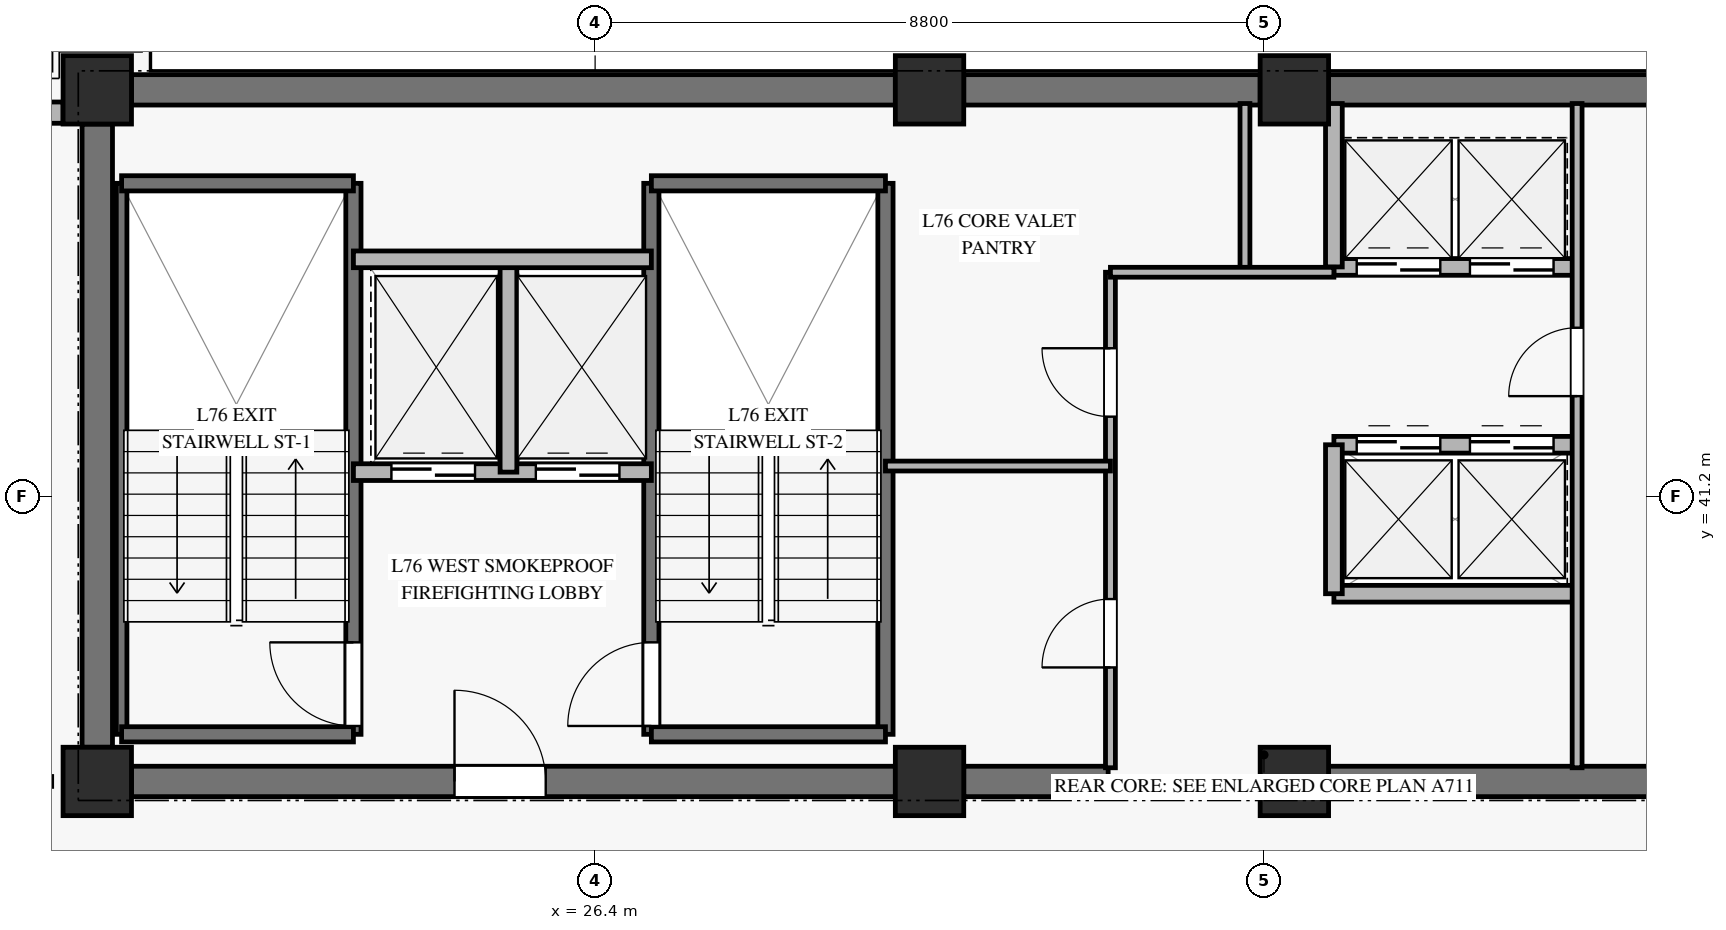
"""IFC4 building model, lengths in metres.
Left out: names, types, materials, properties, quantities, classifications, styles, units other than length and angle.
Written with IfcOpenShell. Run it as: python <this file> out.ifc"""

import sys

from ifc_helpers import new_model, si_unit, direction, frame, frame_2d, origin, origin_2d, place, context, subcontext, project, spatial, rectangle, extrude, source, transform, mapped, element, fill, save


model = new_model("IFC4")
c1 = context("Model", 3, precision=1e-05, world=origin(), true_north=direction((0.0, 1.0)))
c2 = subcontext(c1, "Body", "Model", "MODEL_VIEW")
j1 = project(units=[si_unit("LENGTHUNIT", "METRE"), si_unit("PLANEANGLEUNIT", "RADIAN")], contexts=[c1])
p1 = place(None, origin())
s1 = spatial("IfcSite", under=j1, at=p1, CompositionType="ELEMENT")
p2 = place(p1, origin())
s2 = spatial("IfcBuilding", under=s1, at=p2, CompositionType="ELEMENT")
p3 = place(p2, frame((0.0, 0.0, 297.2)))
s3 = spatial("IfcBuildingStorey", under=s2, at=p3, CompositionType="ELEMENT", Elevation=297.2)
m1 = source(origin(), c2, "Body", "SweptSolid", [
    extrude(rectangle(XDim=0.9, YDim=0.9, at=origin_2d()), origin(), (0.0, 0.0, 1.0), 3.185),
])
for number, where, z_axis, x_axis in (
    (1, (19.85, 37.45, 0.0), (0.0, 0.0, 1.0), (1.0, 0.0, 0.0)),
    (2, (19.85, 46.55, 0.0), (0.0, 0.0, 1.0), (1.0, 0.0, 0.0)),
    (3, (30.8, 37.45, 0.0), (0.0, 0.0, 1.0), (1.0, 0.0, 0.0)),
    (4, (30.8, 46.55, 0.0), (0.0, 0.0, 1.0), (1.0, 0.0, 0.0)),
    (5, (35.6, 37.45, 0.0), (0.0, 0.0, 1.0), (1.0, 0.0, 0.0)),
    (6, (35.6, 46.55, 0.0), (0.0, 0.0, 1.0), (1.0, 0.0, 0.0)),
):
    element("IfcColumn", number, at=place(p3, frame(where, z_axis=z_axis, x_axis=x_axis)), inside=s3, PredefinedType="PILASTER", context=c2, shape_type="MappedRepresentation", body=[
        mapped(m1, transform((0.0, 0.0, 0.0), x_axis=(1.0, 0.0, 0.0), y_axis=(0.0, 1.0, 0.0), z_axis=(0.0, 0.0, 1.0), scale=1.0)),
    ])
p4 = place(p3, frame((20.3, 46.55, 0.0), z_axis=(0.0, 0.0, 1.0), x_axis=(1.0, 0.0, 0.0)))
e7 = element("IfcWall", 7, at=p4, inside=s3, PredefinedType="SHEAR", context=c2, shape_type="SweptSolid", body=[
    extrude(rectangle(XDim=10.05, YDim=0.4, at=frame_2d((5.025, 0.0))), origin(), (0.0, 0.0, 1.0), 3.185),
])
p5 = place(p3, frame((31.25, 46.55, 0.0), z_axis=(0.0, 0.0, 1.0), x_axis=(1.0, 0.0, 0.0)))
e8 = element("IfcWall", 8, at=p5, inside=s3, PredefinedType="SHEAR", context=c2, shape_type="SweptSolid", body=[
    extrude(rectangle(XDim=3.9, YDim=0.4, at=frame_2d((1.95, 0.0))), origin(), (0.0, 0.0, 1.0), 3.185),
])
p6 = place(p3, frame((36.05, 46.55, 0.0), z_axis=(0.0, 0.0, 1.0), x_axis=(1.0, 0.0, 0.0)))
e9 = element("IfcWall", 9, at=p6, inside=s3, PredefinedType="SHEAR", context=c2, shape_type="SweptSolid", body=[
    extrude(rectangle(XDim=7.8, YDim=0.4, at=frame_2d((3.9, 0.0))), origin(), (0.0, 0.0, 1.0), 3.185),
])
p7 = place(p3, frame((20.3, 37.45, 0.0), z_axis=(0.0, 0.0, 1.0), x_axis=(1.0, 0.0, 0.0)))
e10 = element("IfcWall", 10, at=p7, inside=s3, PredefinedType="SHEAR", context=c2, shape_type="SweptSolid", body=[
    extrude(rectangle(XDim=10.05, YDim=0.4, at=frame_2d((5.025, 0.0))), origin(), (0.0, 0.0, 1.0), 3.185),
])
p8 = place(p7, frame((4.25, 0.0, 0.0)))
e11 = element("IfcOpeningElement", 11, at=p8, cuts=e10, PredefinedType="OPENING", context=c2, shape_type="SweptSolid", body=[
    extrude(rectangle(XDim=1.2, YDim=2.15, at=frame_2d((0.6, 1.075))), frame((0.0, 0.21, 0.0), z_axis=(0.0, -1.0, 0.0), x_axis=(1.0, 0.0, 0.0)), (0.0, 0.0, 1.0), 0.42),
])
p9 = place(p3, frame((31.25, 37.45, 0.0), z_axis=(0.0, 0.0, 1.0), x_axis=(1.0, 0.0, 0.0)))
e12 = element("IfcWall", 12, at=p9, inside=s3, PredefinedType="SHEAR", context=c2, shape_type="SweptSolid", body=[
    extrude(rectangle(XDim=1.9, YDim=0.4, at=frame_2d((0.95, 0.0))), origin(), (0.0, 0.0, 1.0), 3.185),
])
p10 = place(p3, frame((36.05, 37.45, 0.0), z_axis=(0.0, 0.0, 1.0), x_axis=(1.0, 0.0, 0.0)))
e13 = element("IfcWall", 13, at=p10, inside=s3, PredefinedType="SHEAR", context=c2, shape_type="SweptSolid", body=[
    extrude(rectangle(XDim=7.8, YDim=0.4, at=frame_2d((3.9, 0.0))), origin(), (0.0, 0.0, 1.0), 3.185),
])
p11 = place(p3, frame((19.85, 37.9, 0.0), z_axis=(0.0, 0.0, 1.0), x_axis=(0.0, 1.0, 0.0)))
e14 = element("IfcWall", 14, at=p11, inside=s3, PredefinedType="SHEAR", context=c2, shape_type="SweptSolid", body=[
    extrude(rectangle(XDim=8.2, YDim=0.4, at=frame_2d((4.1, 0.0))), origin(), (0.0, 0.0, 1.0), 3.185),
])
p12 = place(p3, frame((12.68, 46.25, 0.0), z_axis=(0.0, 0.0, 1.0), x_axis=(1.0, 0.0, 0.0)))
e15 = element("IfcWall", 15, at=p12, inside=s3, PredefinedType="SOLIDWALL", context=c2, shape_type="SweptSolid", body=[
    extrude(rectangle(XDim=6.72, YDim=0.28, at=frame_2d((3.36, 0.0))), origin(), (0.0, 0.0, 1.0), 2.815),
])
p13 = place(p12, frame((2.56, 0.0, 0.45)))
e16 = element("IfcOpeningElement", 16, at=p13, cuts=e15, PredefinedType="OPENING", context=c2, shape_type="SweptSolid", body=[
    extrude(rectangle(XDim=1.6, YDim=2.0, at=frame_2d((0.8, 1.0))), frame((0.0, 0.15, 0.0), z_axis=(0.0, -1.0, 0.0), x_axis=(1.0, 0.0, 0.0)), (0.0, 0.0, 1.0), 0.3),
])
p14 = place(p3, frame((20.17, 38.07, 0.0), z_axis=(0.0, 0.0, 1.0), x_axis=(0.0, 1.0, 0.0)))
e17 = element("IfcWall", 17, at=p14, inside=s3, PredefinedType="SOLIDWALL", context=c2, shape_type="SweptSolid", body=[
    extrude(rectangle(XDim=7.25, YDim=0.14, at=frame_2d((3.625, 0.0))), origin(), (0.0, 0.0, 1.0), 3.4),
])
p15 = place(p3, frame((23.22, 38.07, 0.0), z_axis=(0.0, 0.0, 1.0), x_axis=(0.0, 1.0, 0.0)))
e18 = element("IfcWall", 18, at=p15, inside=s3, PredefinedType="SOLIDWALL", context=c2, shape_type="SweptSolid", body=[
    extrude(rectangle(XDim=7.25, YDim=0.2, at=frame_2d((3.625, 0.0))), origin(), (0.0, 0.0, 1.0), 3.4),
])
p16 = place(p15, frame((0.11, 0.0, 0.0)))
e19 = element("IfcOpeningElement", 19, at=p16, cuts=e18, PredefinedType="OPENING", context=c2, shape_type="SweptSolid", body=[
    extrude(rectangle(XDim=1.1, YDim=2.15, at=frame_2d((0.55, 1.075))), frame((0.0, 0.11, 0.0), z_axis=(0.0, -1.0, 0.0), x_axis=(1.0, 0.0, 0.0)), (0.0, 0.0, 1.0), 0.22),
])
for number, where, z_axis, x_axis in (
    (20, (20.17, 45.32, 0.0), (0.0, 0.0, 1.0), (1.0, 0.0, 0.0)),
    (21, (20.17, 38.07, 0.0), (0.0, 0.0, 1.0), (1.0, 0.0, 0.0)),
):
    element("IfcWall", number, at=place(p3, frame(where, z_axis=z_axis, x_axis=x_axis)), inside=s3, PredefinedType="SOLIDWALL", context=c2, shape_type="SweptSolid", body=[
        extrude(rectangle(XDim=3.05, YDim=0.2, at=frame_2d((1.525, 0.0))), origin(), (0.0, 0.0, 1.0), 3.4),
    ])
p17 = place(p3, frame((27.14, 38.07, 0.0), z_axis=(0.0, 0.0, 1.0), x_axis=(0.0, 1.0, 0.0)))
e22 = element("IfcWall", 22, at=p17, inside=s3, PredefinedType="SOLIDWALL", context=c2, shape_type="SweptSolid", body=[
    extrude(rectangle(XDim=7.25, YDim=0.2, at=frame_2d((3.625, 0.0))), origin(), (0.0, 0.0, 1.0), 3.4),
])
p18 = place(p17, frame((0.11, 0.0, 0.0)))
e23 = element("IfcOpeningElement", 23, at=p18, cuts=e22, PredefinedType="OPENING", context=c2, shape_type="SweptSolid", body=[
    extrude(rectangle(XDim=1.1, YDim=2.15, at=frame_2d((0.55, 1.075))), frame((0.0, 0.11, 0.0), z_axis=(0.0, -1.0, 0.0), x_axis=(1.0, 0.0, 0.0)), (0.0, 0.0, 1.0), 0.22),
])
p19 = place(p3, frame((30.22, 38.07, 0.0), z_axis=(0.0, 0.0, 1.0), x_axis=(0.0, 1.0, 0.0)))
e24 = element("IfcWall", 24, at=p19, inside=s3, PredefinedType="SOLIDWALL", context=c2, shape_type="SweptSolid", body=[
    extrude(rectangle(XDim=7.25, YDim=0.2, at=frame_2d((3.625, 0.0))), origin(), (0.0, 0.0, 1.0), 3.4),
])
for number, where, z_axis, x_axis in (
    (25, (27.14, 45.32, 0.0), (0.0, 0.0, 1.0), (1.0, 0.0, 0.0)),
    (26, (27.14, 38.07, 0.0), (0.0, 0.0, 1.0), (1.0, 0.0, 0.0)),
):
    element("IfcWall", number, at=place(p3, frame(where, z_axis=z_axis, x_axis=x_axis)), inside=s3, PredefinedType="SOLIDWALL", context=c2, shape_type="SweptSolid", body=[
        extrude(rectangle(XDim=3.08, YDim=0.2, at=frame_2d((1.54, 0.0))), origin(), (0.0, 0.0, 1.0), 3.4),
    ])
p20 = place(p3, frame((23.22, 41.52, 0.0), z_axis=(0.0, 0.0, 1.0), x_axis=(1.0, 0.0, 0.0)))
e27 = element("IfcWall", 27, at=p20, inside=s3, PredefinedType="SOLIDWALL", context=c2, shape_type="SweptSolid", body=[
    extrude(rectangle(XDim=3.92, YDim=0.22, at=frame_2d((1.96, 0.0))), origin(), (0.0, 0.0, 1.0), 3.185),
])
p21 = place(p20, frame((0.5, 0.0, 0.0)))
e28 = element("IfcOpeningElement", 28, at=p21, cuts=e27, PredefinedType="OPENING", context=c2, shape_type="SweptSolid", body=[
    extrude(rectangle(XDim=1.1, YDim=2.2, at=frame_2d((0.55, 1.1))), frame((0.0, 0.12, 0.0), z_axis=(0.0, -1.0, 0.0), x_axis=(1.0, 0.0, 0.0)), (0.0, 0.0, 1.0), 0.24),
])
p22 = place(p20, frame((2.4, 0.0, 0.0)))
e29 = element("IfcOpeningElement", 29, at=p22, cuts=e27, PredefinedType="OPENING", context=c2, shape_type="SweptSolid", body=[
    extrude(rectangle(XDim=1.1, YDim=2.2, at=frame_2d((0.55, 1.1))), frame((0.0, 0.12, 0.0), z_axis=(0.0, -1.0, 0.0), x_axis=(1.0, 0.0, 0.0)), (0.0, 0.0, 1.0), 0.24),
])
p23 = place(p3, frame((25.26, 41.52, 0.0), z_axis=(0.0, 0.0, 1.0), x_axis=(0.0, 1.0, 0.0)))
e30 = element("IfcWall", 30, at=p23, inside=s3, PredefinedType="SOLIDWALL", context=c2, shape_type="SweptSolid", body=[
    extrude(rectangle(XDim=2.8, YDim=0.22, at=frame_2d((1.4, 0.0))), origin(), (0.0, 0.0, 1.0), 3.185),
])
p24 = place(p3, frame((23.22, 44.32, 0.0), z_axis=(0.0, 0.0, 1.0), x_axis=(1.0, 0.0, 0.0)))
e31 = element("IfcWall", 31, at=p24, inside=s3, PredefinedType="SOLIDWALL", context=c2, shape_type="SweptSolid", body=[
    extrude(rectangle(XDim=3.92, YDim=0.22, at=frame_2d((1.96, 0.0))), origin(), (0.0, 0.0, 1.0), 3.185),
])
p25 = place(p3, frame((36.12, 44.22, 0.0), z_axis=(0.0, 0.0, 1.0), x_axis=(1.0, 0.0, 0.0)))
e32 = element("IfcWall", 32, at=p25, inside=s3, PredefinedType="SOLIDWALL", context=c2, shape_type="SweptSolid", body=[
    extrude(rectangle(XDim=3.2, YDim=0.22, at=frame_2d((1.6, 0.0))), origin(), (0.0, 0.0, 1.0), 3.185),
])
p26 = place(p25, frame((0.3, 0.0, 0.0)))
e33 = element("IfcOpeningElement", 33, at=p26, cuts=e32, PredefinedType="OPENING", context=c2, shape_type="SweptSolid", body=[
    extrude(rectangle(XDim=1.1, YDim=2.2, at=frame_2d((0.55, 1.1))), frame((0.0, 0.12, 0.0), z_axis=(0.0, -1.0, 0.0), x_axis=(1.0, 0.0, 0.0)), (0.0, 0.0, 1.0), 0.24),
])
p27 = place(p25, frame((1.79, 0.0, 0.0)))
e34 = element("IfcOpeningElement", 34, at=p27, cuts=e32, PredefinedType="OPENING", context=c2, shape_type="SweptSolid", body=[
    extrude(rectangle(XDim=1.1, YDim=2.2, at=frame_2d((0.55, 1.1))), frame((0.0, 0.12, 0.0), z_axis=(0.0, -1.0, 0.0), x_axis=(1.0, 0.0, 0.0)), (0.0, 0.0, 1.0), 0.24),
])
p28 = place(p3, frame((36.12, 41.88, 0.0), z_axis=(0.0, 0.0, 1.0), x_axis=(1.0, 0.0, 0.0)))
e35 = element("IfcWall", 35, at=p28, inside=s3, PredefinedType="SOLIDWALL", context=c2, shape_type="SweptSolid", body=[
    extrude(rectangle(XDim=3.2, YDim=0.22, at=frame_2d((1.6, 0.0))), origin(), (0.0, 0.0, 1.0), 3.185),
])
p29 = place(p28, frame((0.3, 0.0, 0.0)))
e36 = element("IfcOpeningElement", 36, at=p29, cuts=e35, PredefinedType="OPENING", context=c2, shape_type="SweptSolid", body=[
    extrude(rectangle(XDim=1.1, YDim=2.2, at=frame_2d((0.55, 1.1))), frame((0.0, 0.12, 0.0), z_axis=(0.0, -1.0, 0.0), x_axis=(1.0, 0.0, 0.0)), (0.0, 0.0, 1.0), 0.24),
])
p30 = place(p28, frame((1.79, 0.0, 0.0)))
e37 = element("IfcOpeningElement", 37, at=p30, cuts=e35, PredefinedType="OPENING", context=c2, shape_type="SweptSolid", body=[
    extrude(rectangle(XDim=1.1, YDim=2.2, at=frame_2d((0.55, 1.1))), frame((0.0, 0.12, 0.0), z_axis=(0.0, -1.0, 0.0), x_axis=(1.0, 0.0, 0.0)), (0.0, 0.0, 1.0), 0.24),
])
p31 = place(p3, frame((36.12, 39.92, 0.0), z_axis=(0.0, 0.0, 1.0), x_axis=(1.0, 0.0, 0.0)))
e38 = element("IfcWall", 38, at=p31, inside=s3, PredefinedType="SOLIDWALL", context=c2, shape_type="SweptSolid", body=[
    extrude(rectangle(XDim=3.2, YDim=0.22, at=frame_2d((1.6, 0.0))), origin(), (0.0, 0.0, 1.0), 3.185),
])
p32 = place(p3, frame((36.12, 39.92, 0.0), z_axis=(0.0, 0.0, 1.0), x_axis=(0.0, 1.0, 0.0)))
e39 = element("IfcWall", 39, at=p32, inside=s3, PredefinedType="SOLIDWALL", context=c2, shape_type="SweptSolid", body=[
    extrude(rectangle(XDim=1.96, YDim=0.22, at=frame_2d((0.98, 0.0))), origin(), (0.0, 0.0, 1.0), 3.185),
])
p33 = place(p3, frame((36.12, 44.22, 0.0), z_axis=(0.0, 0.0, 1.0), x_axis=(0.0, 1.0, 0.0)))
e40 = element("IfcWall", 40, at=p33, inside=s3, PredefinedType="SOLIDWALL", context=c2, shape_type="SweptSolid", body=[
    extrude(rectangle(XDim=2.15, YDim=0.22, at=frame_2d((1.075, 0.0))), origin(), (0.0, 0.0, 1.0), 3.185),
])
p34 = place(p3, frame((33.18, 37.63, 0.0), z_axis=(0.0, 0.0, 1.0), x_axis=(0.0, 1.0, 0.0)))
e41 = element("IfcWall", 41, at=p34, inside=s3, PredefinedType="PARTITIONING", context=c2, shape_type="SweptSolid", body=[
    extrude(rectangle(XDim=6.52, YDim=0.13, at=frame_2d((3.26, 0.0))), origin(), (0.0, 0.0, 1.0), 2.27),
])
p35 = place(p34, frame((1.32, 0.0, 0.0)))
e42 = element("IfcOpeningElement", 42, at=p35, cuts=e41, PredefinedType="OPENING", context=c2, shape_type="SweptSolid", body=[
    extrude(rectangle(XDim=0.9, YDim=2.1, at=frame_2d((0.45, 1.05))), frame((0.0, 0.075, 0.0), z_axis=(0.0, -1.0, 0.0), x_axis=(1.0, 0.0, 0.0)), (0.0, 0.0, 1.0), 0.15),
])
p36 = place(p34, frame((4.62, 0.0, 0.0)))
e43 = element("IfcOpeningElement", 43, at=p36, cuts=e41, PredefinedType="OPENING", context=c2, shape_type="SweptSolid", body=[
    extrude(rectangle(XDim=0.9, YDim=2.1, at=frame_2d((0.45, 1.05))), frame((0.0, 0.075, 0.0), z_axis=(0.0, -1.0, 0.0), x_axis=(1.0, 0.0, 0.0)), (0.0, 0.0, 1.0), 0.15),
])
p37 = place(p3, frame((34.95, 44.15, 0.0), z_axis=(0.0, 0.0, 1.0), x_axis=(0.0, 1.0, 0.0)))
e44 = element("IfcWall", 44, at=p37, inside=s3, PredefinedType="PARTITIONING", context=c2, shape_type="SweptSolid", body=[
    extrude(rectangle(XDim=2.22, YDim=0.13, at=frame_2d((1.11, 0.0))), origin(), (0.0, 0.0, 1.0), 3.185),
])
p38 = place(p3, frame((33.18, 44.15, 0.0), z_axis=(0.0, 0.0, 1.0), x_axis=(1.0, 0.0, 0.0)))
e45 = element("IfcWall", 45, at=p38, inside=s3, PredefinedType="PARTITIONING", context=c2, shape_type="SweptSolid", body=[
    extrude(rectangle(XDim=2.94, YDim=0.13, at=frame_2d((1.47, 0.0))), origin(), (0.0, 0.0, 1.0), 2.47),
])
p39 = place(p3, frame((39.32, 37.63, 0.0), z_axis=(0.0, 0.0, 1.0), x_axis=(0.0, 1.0, 0.0)))
e46 = element("IfcWall", 46, at=p39, inside=s3, PredefinedType="PARTITIONING", context=c2, shape_type="SweptSolid", body=[
    extrude(rectangle(XDim=8.74, YDim=0.13, at=frame_2d((4.37, 0.0))), origin(), (0.0, 0.0, 1.0), 3.185),
])
p40 = place(p39, frame((4.89, 0.0, 0.0)))
e47 = element("IfcOpeningElement", 47, at=p40, cuts=e46, PredefinedType="OPENING", context=c2, shape_type="SweptSolid", body=[
    extrude(rectangle(XDim=0.9, YDim=2.1, at=frame_2d((0.45, 1.05))), frame((0.0, 0.075, 0.0), z_axis=(0.0, -1.0, 0.0), x_axis=(1.0, 0.0, 0.0)), (0.0, 0.0, 1.0), 0.15),
])
p41 = place(p3, frame((30.22, 41.6, 0.0), z_axis=(0.0, 0.0, 1.0), x_axis=(1.0, 0.0, 0.0)))
e48 = element("IfcWall", 48, at=p41, inside=s3, PredefinedType="PARTITIONING", context=c2, shape_type="SweptSolid", body=[
    extrude(rectangle(XDim=2.96, YDim=0.13, at=frame_2d((1.48, 0.0))), origin(), (0.0, 0.0, 1.0), 2.47),
])
m2 = source(origin(), c2, "Body", "SweptSolid", [
    extrude(rectangle(XDim=1.1, YDim=2.15, at=frame_2d((0.55, 1.075))), frame((0.0, 0.025, 0.0), z_axis=(0.0, -1.0, 0.0), x_axis=(1.0, 0.0, 0.0)), (0.0, 0.0, 1.0), 0.05),
])
p42 = place(p16, origin())
e49 = element("IfcDoor", 49, at=p42, inside=s3, OperationType="SINGLE_SWING_RIGHT", PredefinedType="DOOR", context=c2, shape_type="MappedRepresentation", body=[
    mapped(m2, transform((0.0, 0.0, 0.0), x_axis=(1.0, 0.0, 0.0), y_axis=(0.0, 1.0, 0.0), z_axis=(0.0, 0.0, 1.0), scale=1.0)),
])
fill(e19, e49)
p43 = place(p18, origin())
e50 = element("IfcDoor", 50, at=p43, inside=s3, OperationType="SINGLE_SWING_LEFT", PredefinedType="DOOR", context=c2, shape_type="MappedRepresentation", body=[
    mapped(m2, transform((0.0, 0.0, 0.0), x_axis=(1.0, 0.0, 0.0), y_axis=(0.0, 1.0, 0.0), z_axis=(0.0, 0.0, 1.0), scale=1.0)),
])
fill(e23, e50)
m3 = source(origin(), c2, "Body", "SweptSolid", [
    extrude(rectangle(XDim=1.1, YDim=2.2, at=frame_2d((0.55, 1.1))), frame((0.0, 0.025, 0.0), z_axis=(0.0, -1.0, 0.0), x_axis=(1.0, 0.0, 0.0)), (0.0, 0.0, 1.0), 0.05),
])
p44 = place(p21, origin())
e51 = element("IfcDoor", 51, at=p44, inside=s3, OperationType="SLIDING_TO_LEFT", PredefinedType="DOOR", context=c2, shape_type="MappedRepresentation", body=[
    mapped(m3, transform((0.0, 0.0, 0.0), x_axis=(1.0, 0.0, 0.0), y_axis=(0.0, 1.0, 0.0), z_axis=(0.0, 0.0, 1.0), scale=1.0)),
])
fill(e28, e51)
p45 = place(p22, origin())
e52 = element("IfcDoor", 52, at=p45, inside=s3, OperationType="SLIDING_TO_LEFT", PredefinedType="DOOR", context=c2, shape_type="MappedRepresentation", body=[
    mapped(m3, transform((0.0, 0.0, 0.0), x_axis=(1.0, 0.0, 0.0), y_axis=(0.0, 1.0, 0.0), z_axis=(0.0, 0.0, 1.0), scale=1.0)),
])
fill(e29, e52)
m4 = source(origin(), c2, "Body", "SweptSolid", [
    extrude(rectangle(XDim=1.2, YDim=2.15, at=frame_2d((0.6, 1.075))), frame((0.0, 0.025, 0.0), z_axis=(0.0, -1.0, 0.0), x_axis=(1.0, 0.0, 0.0)), (0.0, 0.0, 1.0), 0.05),
])
p46 = place(p8, origin())
e53 = element("IfcDoor", 53, at=p46, inside=s3, OperationType="SINGLE_SWING_LEFT", PredefinedType="DOOR", context=c2, shape_type="MappedRepresentation", body=[
    mapped(m4, transform((0.0, 0.0, 0.0), x_axis=(1.0, 0.0, 0.0), y_axis=(0.0, 1.0, 0.0), z_axis=(0.0, 0.0, 1.0), scale=1.0)),
])
fill(e11, e53)
p47 = place(p26, origin())
e54 = element("IfcDoor", 54, at=p47, inside=s3, OperationType="SLIDING_TO_LEFT", PredefinedType="DOOR", context=c2, shape_type="MappedRepresentation", body=[
    mapped(m3, transform((0.0, 0.0, 0.0), x_axis=(1.0, 0.0, 0.0), y_axis=(0.0, 1.0, 0.0), z_axis=(0.0, 0.0, 1.0), scale=1.0)),
])
fill(e33, e54)
p48 = place(p27, origin())
e55 = element("IfcDoor", 55, at=p48, inside=s3, OperationType="SLIDING_TO_LEFT", PredefinedType="DOOR", context=c2, shape_type="MappedRepresentation", body=[
    mapped(m3, transform((0.0, 0.0, 0.0), x_axis=(1.0, 0.0, 0.0), y_axis=(0.0, 1.0, 0.0), z_axis=(0.0, 0.0, 1.0), scale=1.0)),
])
fill(e34, e55)
p49 = place(p29, origin())
e56 = element("IfcDoor", 56, at=p49, inside=s3, OperationType="SLIDING_TO_LEFT", PredefinedType="DOOR", context=c2, shape_type="MappedRepresentation", body=[
    mapped(m3, transform((0.0, 0.0, 0.0), x_axis=(1.0, 0.0, 0.0), y_axis=(0.0, 1.0, 0.0), z_axis=(0.0, 0.0, 1.0), scale=1.0)),
])
fill(e36, e56)
p50 = place(p30, origin())
e57 = element("IfcDoor", 57, at=p50, inside=s3, OperationType="SLIDING_TO_LEFT", PredefinedType="DOOR", context=c2, shape_type="MappedRepresentation", body=[
    mapped(m3, transform((0.0, 0.0, 0.0), x_axis=(1.0, 0.0, 0.0), y_axis=(0.0, 1.0, 0.0), z_axis=(0.0, 0.0, 1.0), scale=1.0)),
])
fill(e37, e57)
m5 = source(origin(), c2, "Body", "SweptSolid", [
    extrude(rectangle(XDim=0.9, YDim=2.1, at=frame_2d((0.45, 1.05))), frame((0.0, 0.025, 0.0), z_axis=(0.0, -1.0, 0.0), x_axis=(1.0, 0.0, 0.0)), (0.0, 0.0, 1.0), 0.05),
])
p51 = place(p35, origin())
e58 = element("IfcDoor", 58, at=p51, inside=s3, OperationType="SINGLE_SWING_LEFT", PredefinedType="DOOR", context=c2, shape_type="MappedRepresentation", body=[
    mapped(m5, transform((0.0, 0.0, 0.0), x_axis=(1.0, 0.0, 0.0), y_axis=(0.0, 1.0, 0.0), z_axis=(0.0, 0.0, 1.0), scale=1.0)),
])
fill(e42, e58)
p52 = place(p36, origin())
e59 = element("IfcDoor", 59, at=p52, inside=s3, OperationType="SINGLE_SWING_RIGHT", PredefinedType="DOOR", context=c2, shape_type="MappedRepresentation", body=[
    mapped(m5, transform((0.0, 0.0, 0.0), x_axis=(1.0, 0.0, 0.0), y_axis=(0.0, 1.0, 0.0), z_axis=(0.0, 0.0, 1.0), scale=1.0)),
])
fill(e43, e59)
p53 = place(p40, origin())
e60 = element("IfcDoor", 60, at=p53, inside=s3, OperationType="SINGLE_SWING_LEFT", PredefinedType="DOOR", context=c2, shape_type="MappedRepresentation", body=[
    mapped(m5, transform((0.0, 0.0, 0.0), x_axis=(1.0, 0.0, 0.0), y_axis=(0.0, 1.0, 0.0), z_axis=(0.0, 0.0, 1.0), scale=1.0)),
])
fill(e47, e60)
save(model, sys.argv[1])
